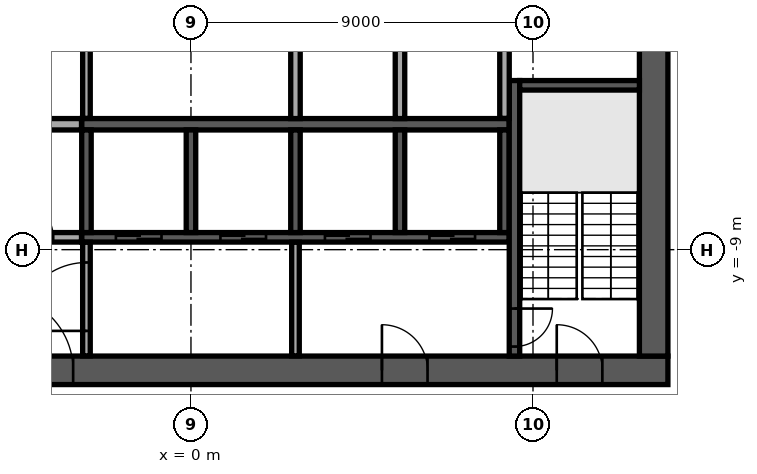
"""IFC4 building model, lengths in metres.
Left out: names, types, materials, properties, quantities, classifications, styles, units other than length and angle.
Written with IfcOpenShell. Run it as: python <this file> out.ifc"""

import sys

from ifc_helpers import new_model, si_unit, direction, frame, frame_2d, origin, place, context, subcontext, project, spatial, rectangle, extrude, element, fill, save


model = new_model("IFC4")
c1 = context("Model", 3, precision=1e-05, world=origin(), true_north=direction((0.0, 1.0)))
c2 = subcontext(c1, "Body", "Model", "MODEL_VIEW")
j1 = project(units=[si_unit("LENGTHUNIT", "METRE"), si_unit("PLANEANGLEUNIT", "RADIAN")], contexts=[c1])
p1 = place(None, origin())
s1 = spatial("IfcSite", under=j1, at=p1, CompositionType="ELEMENT")
p2 = place(p1, origin())
s2 = spatial("IfcBuilding", under=s1, at=p2, CompositionType="ELEMENT")
p3 = place(p2, frame((0.0, 0.0, 242.9)))
s3 = spatial("IfcBuildingStorey", under=s2, at=p3, CompositionType="ELEMENT", Elevation=242.9)
p4 = place(p3, frame((-12.55, -12.175, 0.0), z_axis=(0.0, 0.0, 1.0), x_axis=(1.0, 0.0, 0.0)))
e1 = element("IfcWall", 1, at=p4, inside=s3, PredefinedType="SHEAR", context=c2, shape_type="SweptSolid", body=[
    extrude(rectangle(XDim=25.1, YDim=0.75, at=frame_2d((12.55, 0.0))), origin(), (0.0, 0.0, 1.0), 3.64),
])
p5 = place(p4, frame((7.45, 0.0, 0.0)))
e2 = element("IfcOpeningElement", 2, at=p5, cuts=e1, PredefinedType="OPENING", context=c2, shape_type="SweptSolid", body=[
    extrude(rectangle(XDim=2.0, YDim=2.1, at=frame_2d((1.0, 1.05))), frame((0.0, 0.385, 0.0), z_axis=(0.0, -1.0, 0.0), x_axis=(1.0, 0.0, 0.0)), (0.0, 0.0, 1.0), 0.77),
])
p6 = place(p4, frame((17.575, 0.0, 0.0)))
e3 = element("IfcOpeningElement", 3, at=p6, cuts=e1, PredefinedType="OPENING", context=c2, shape_type="SweptSolid", body=[
    extrude(rectangle(XDim=1.2, YDim=2.1, at=frame_2d((0.6, 1.05))), frame((0.0, 0.385, 0.0), z_axis=(0.0, -1.0, 0.0), x_axis=(1.0, 0.0, 0.0)), (0.0, 0.0, 1.0), 0.77),
])
p7 = place(p4, frame((1.725, 0.0, 0.0)))
e4 = element("IfcOpeningElement", 4, at=p7, cuts=e1, PredefinedType="OPENING", context=c2, shape_type="SweptSolid", body=[
    extrude(rectangle(XDim=1.2, YDim=2.1, at=frame_2d((0.6, 1.05))), frame((0.0, 0.385, 0.0), z_axis=(0.0, -1.0, 0.0), x_axis=(1.0, 0.0, 0.0)), (0.0, 0.0, 1.0), 0.77),
])
p8 = place(p4, frame((22.175, 0.0, 0.0)))
e5 = element("IfcOpeningElement", 5, at=p8, cuts=e1, PredefinedType="OPENING", context=c2, shape_type="SweptSolid", body=[
    extrude(rectangle(XDim=1.2, YDim=2.1, at=frame_2d((0.6, 1.05))), frame((0.0, 0.385, 0.0), z_axis=(0.0, -1.0, 0.0), x_axis=(1.0, 0.0, 0.0)), (0.0, 0.0, 1.0), 0.77),
])
p9 = place(p3, frame((12.175, -11.8, 0.0), z_axis=(0.0, 0.0, 1.0), x_axis=(0.0, 1.0, 0.0)))
e6 = element("IfcWall", 6, at=p9, inside=s3, PredefinedType="SHEAR", context=c2, shape_type="SweptSolid", body=[
    extrude(rectangle(XDim=23.6, YDim=0.75, at=frame_2d((11.8, 0.0))), origin(), (0.0, 0.0, 1.0), 3.64),
])
p10 = place(p9, frame((10.6, 0.0, 0.0)))
e7 = element("IfcOpeningElement", 7, at=p10, cuts=e6, PredefinedType="OPENING", context=c2, shape_type="SweptSolid", body=[
    extrude(rectangle(XDim=2.4, YDim=2.4, at=frame_2d((1.2, 1.2))), frame((0.0, 0.385, 0.0), z_axis=(0.0, -1.0, 0.0), x_axis=(1.0, 0.0, 0.0)), (0.0, 0.0, 1.0), 0.77),
])
p11 = place(p3, frame((-2.875, -5.7, 0.0), z_axis=(0.0, 0.0, 1.0), x_axis=(1.0, 0.0, 0.0)))
e8 = element("IfcWall", 8, at=p11, inside=s3, PredefinedType="SOLIDWALL", context=c2, shape_type="SweptSolid", body=[
    extrude(rectangle(XDim=11.25, YDim=0.3, at=frame_2d((5.625, 0.0))), origin(), (0.0, 0.0, 1.0), 3.64),
])
for number, where, z_axis, x_axis in (
    (9, (2.75, -5.55, 0.0), (0.0, 0.0, 1.0), (0.0, 1.0, 0.0)),
    (10, (5.5, -5.55, 0.0), (0.0, 0.0, 1.0), (0.0, 1.0, 0.0)),
):
    element("IfcWall", number, at=place(p3, frame(where, z_axis=z_axis, x_axis=x_axis)), inside=s3, PredefinedType="SOLIDWALL", context=c2, shape_type="SweptSolid", body=[
        extrude(rectangle(XDim=2.7, YDim=0.25, at=frame_2d((1.35, 0.0))), origin(), (0.0, 0.0, 1.0), 3.64),
    ])
p12 = place(p3, frame((-2.875, -8.675, 0.0), z_axis=(0.0, 0.0, 1.0), x_axis=(1.0, 0.0, 0.0)))
e11 = element("IfcWall", 11, at=p12, inside=s3, PredefinedType="SOLIDWALL", context=c2, shape_type="SweptSolid", body=[
    extrude(rectangle(XDim=11.25, YDim=0.25, at=frame_2d((5.625, 0.0))), origin(), (0.0, 0.0, 1.0), 3.64),
])
p13 = place(p12, frame((0.9, 0.0, 0.0)))
e12 = element("IfcOpeningElement", 12, at=p13, cuts=e11, PredefinedType="OPENING", context=c2, shape_type="SweptSolid", body=[
    extrude(rectangle(XDim=1.2, YDim=2.1, at=frame_2d((0.6, 1.05))), frame((0.0, 0.135, 0.0), z_axis=(0.0, -1.0, 0.0), x_axis=(1.0, 0.0, 0.0)), (0.0, 0.0, 1.0), 0.27),
])
p14 = place(p12, frame((3.65, 0.0, 0.0)))
e13 = element("IfcOpeningElement", 13, at=p14, cuts=e11, PredefinedType="OPENING", context=c2, shape_type="SweptSolid", body=[
    extrude(rectangle(XDim=1.2, YDim=2.1, at=frame_2d((0.6, 1.05))), frame((0.0, 0.135, 0.0), z_axis=(0.0, -1.0, 0.0), x_axis=(1.0, 0.0, 0.0)), (0.0, 0.0, 1.0), 0.27),
])
p15 = place(p12, frame((6.4, 0.0, 0.0)))
e14 = element("IfcOpeningElement", 14, at=p15, cuts=e11, PredefinedType="OPENING", context=c2, shape_type="SweptSolid", body=[
    extrude(rectangle(XDim=1.2, YDim=2.1, at=frame_2d((0.6, 1.05))), frame((0.0, 0.135, 0.0), z_axis=(0.0, -1.0, 0.0), x_axis=(1.0, 0.0, 0.0)), (0.0, 0.0, 1.0), 0.27),
])
p16 = place(p12, frame((9.15, 0.0, 0.0)))
e15 = element("IfcOpeningElement", 15, at=p16, cuts=e11, PredefinedType="OPENING", context=c2, shape_type="SweptSolid", body=[
    extrude(rectangle(XDim=1.2, YDim=2.1, at=frame_2d((0.6, 1.05))), frame((0.0, 0.135, 0.0), z_axis=(0.0, -1.0, 0.0), x_axis=(1.0, 0.0, 0.0)), (0.0, 0.0, 1.0), 0.27),
])
for number, where, z_axis, x_axis in (
    (16, (-2.75, -8.55, 0.0), (0.0, 0.0, 1.0), (0.0, 1.0, 0.0)),
    (17, (0.0, -8.55, 0.0), (0.0, 0.0, 1.0), (0.0, 1.0, 0.0)),
    (18, (2.75, -8.55, 0.0), (0.0, 0.0, 1.0), (0.0, 1.0, 0.0)),
    (19, (5.5, -8.55, 0.0), (0.0, 0.0, 1.0), (0.0, 1.0, 0.0)),
    (20, (8.25, -8.55, 0.0), (0.0, 0.0, 1.0), (0.0, 1.0, 0.0)),
):
    element("IfcWall", number, at=place(p3, frame(where, z_axis=z_axis, x_axis=x_axis)), inside=s3, PredefinedType="SOLIDWALL", context=c2, shape_type="SweptSolid", body=[
        extrude(rectangle(XDim=2.7, YDim=0.25, at=frame_2d((1.35, 0.0))), origin(), (0.0, 0.0, 1.0), 3.64),
    ])
p17 = place(p3, frame((8.512, -4.55, 0.0), z_axis=(0.0, 0.0, 1.0), x_axis=(0.0, -1.0, 0.0)))
e21 = element("IfcWall", 21, at=p17, inside=s3, PredefinedType="SOLIDWALL", context=c2, shape_type="SweptSolid", body=[
    extrude(rectangle(XDim=7.25, YDim=0.275, at=frame_2d((3.625, 0.0))), origin(), (0.0, 0.0, 1.0), 3.64),
])
p18 = place(p17, frame((6.0, 0.0, 0.0)))
e22 = element("IfcOpeningElement", 22, at=p18, cuts=e21, PredefinedType="OPENING", context=c2, shape_type="SweptSolid", body=[
    extrude(rectangle(XDim=1.0, YDim=2.1, at=frame_2d((0.5, 1.05))), frame((0.0, 0.147, 0.0), z_axis=(0.0, -1.0, 0.0), x_axis=(1.0, 0.0, 0.0)), (0.0, 0.0, 1.0), 0.295),
])
p19 = place(p3, frame((8.65, -4.675, 0.0), z_axis=(0.0, 0.0, 1.0), x_axis=(1.0, 0.0, 0.0)))
e23 = element("IfcWall", 23, at=p19, inside=s3, PredefinedType="SOLIDWALL", context=c2, shape_type="SweptSolid", body=[
    extrude(rectangle(XDim=3.15, YDim=0.25, at=frame_2d((1.575, 0.0))), origin(), (0.0, 0.0, 1.0), 3.64),
])
p20 = place(p3, frame((-2.75, -11.795, 0.0), z_axis=(0.0, 0.0, 1.0), x_axis=(0.0, 1.0, 0.0)))
e24 = element("IfcWall", 24, at=p20, inside=s3, PredefinedType="PARTITIONING", context=c2, shape_type="SweptSolid", body=[
    extrude(rectangle(XDim=2.99, YDim=0.2, at=frame_2d((1.495, 0.0))), origin(), (0.0, 0.0, 1.0), 3.64),
])
p21 = place(p20, frame((0.657, 0.0, 0.0)))
e25 = element("IfcOpeningElement", 25, at=p21, cuts=e24, PredefinedType="OPENING", context=c2, shape_type="SweptSolid", body=[
    extrude(rectangle(XDim=1.8, YDim=2.1, at=frame_2d((0.9, 1.05))), frame((0.0, 0.11, 0.0), z_axis=(0.0, -1.0, 0.0), x_axis=(1.0, 0.0, 0.0)), (0.0, 0.0, 1.0), 0.22),
])
p22 = place(p3, frame((2.75, -11.795, 0.0), z_axis=(0.0, 0.0, 1.0), x_axis=(0.0, 1.0, 0.0)))
e26 = element("IfcWall", 26, at=p22, inside=s3, PredefinedType="PARTITIONING", context=c2, shape_type="SweptSolid", body=[
    extrude(rectangle(XDim=2.99, YDim=0.2, at=frame_2d((1.495, 0.0))), origin(), (0.0, 0.0, 1.0), 3.64),
])
p23 = place(p3, frame((-8.37, -8.675, 0.0), z_axis=(0.0, 0.0, 1.0), x_axis=(1.0, 0.0, 0.0)))
e27 = element("IfcWall", 27, at=p23, inside=s3, PredefinedType="PARTITIONING", context=c2, shape_type="SweptSolid", body=[
    extrude(rectangle(XDim=5.49, YDim=0.25, at=frame_2d((2.745, 0.0))), origin(), (0.0, 0.0, 1.0), 3.64),
])
p24 = place(p23, frame((0.995, 0.0, 0.0)))
e28 = element("IfcOpeningElement", 28, at=p24, cuts=e27, PredefinedType="OPENING", context=c2, shape_type="SweptSolid", body=[
    extrude(rectangle(XDim=1.0, YDim=2.1, at=frame_2d((0.5, 1.05))), frame((0.0, 0.135, 0.0), z_axis=(0.0, -1.0, 0.0), x_axis=(1.0, 0.0, 0.0)), (0.0, 0.0, 1.0), 0.27),
])
p25 = place(p23, frame((3.745, 0.0, 0.0)))
e29 = element("IfcOpeningElement", 29, at=p25, cuts=e27, PredefinedType="OPENING", context=c2, shape_type="SweptSolid", body=[
    extrude(rectangle(XDim=1.0, YDim=2.1, at=frame_2d((0.5, 1.05))), frame((0.0, 0.135, 0.0), z_axis=(0.0, -1.0, 0.0), x_axis=(1.0, 0.0, 0.0)), (0.0, 0.0, 1.0), 0.27),
])
p26 = place(p3, frame((-8.35, -5.7, 0.0), z_axis=(0.0, 0.0, 1.0), x_axis=(1.0, 0.0, 0.0)))
e30 = element("IfcWall", 30, at=p26, inside=s3, PredefinedType="PARTITIONING", context=c2, shape_type="SweptSolid", body=[
    extrude(rectangle(XDim=5.47, YDim=0.3, at=frame_2d((2.735, 0.0))), origin(), (0.0, 0.0, 1.0), 3.64),
])
p27 = place(p3, frame((-2.75, -5.545, 0.0), z_axis=(0.0, 0.0, 1.0), x_axis=(0.0, 1.0, 0.0)))
e31 = element("IfcWall", 31, at=p27, inside=s3, PredefinedType="PARTITIONING", context=c2, shape_type="SweptSolid", body=[
    extrude(rectangle(XDim=2.69, YDim=0.2, at=frame_2d((1.345, 0.0))), origin(), (0.0, 0.0, 1.0), 3.64),
])
p28 = place(p3, frame((8.25, -5.545, 0.0), z_axis=(0.0, 0.0, 1.0), x_axis=(0.0, 1.0, 0.0)))
e32 = element("IfcWall", 32, at=p28, inside=s3, PredefinedType="PARTITIONING", context=c2, shape_type="SweptSolid", body=[
    extrude(rectangle(XDim=2.69, YDim=0.25, at=frame_2d((1.345, 0.0))), origin(), (0.0, 0.0, 1.0), 3.64),
])
p29 = place(p3, frame((5.206, -33.362, 0.0), z_axis=(0.0, 0.0, 1.0), x_axis=(0.573577438409, 0.81915134264, 0.0)))
e33 = element("IfcWall", 33, at=p29, inside=s3, PredefinedType="STANDARD", context=c2, shape_type="SweptSolid", body=[
    extrude(rectangle(XDim=48.686, YDim=0.6, at=frame_2d((24.343, 0.0))), origin(), (0.0, 0.0, 1.0), 3.64),
])
p30 = place(p29, frame((1.213, 0.0, 0.9)))
e34 = element("IfcOpeningElement", 34, at=p30, cuts=e33, PredefinedType="OPENING", context=c2, shape_type="SweptSolid", body=[
    extrude(rectangle(XDim=2.0, YDim=2.1, at=frame_2d((1.0, 1.05))), frame((0.0, 0.31, 0.0), z_axis=(0.0, -1.0, 0.0), x_axis=(1.0, 0.0, 0.0)), (0.0, 0.0, 1.0), 0.62),
])
p31 = place(p29, frame((5.639, 0.0, 0.9)))
e35 = element("IfcOpeningElement", 35, at=p31, cuts=e33, PredefinedType="OPENING", context=c2, shape_type="SweptSolid", body=[
    extrude(rectangle(XDim=2.0, YDim=2.1, at=frame_2d((1.0, 1.05))), frame((0.0, 0.31, 0.0), z_axis=(0.0, -1.0, 0.0), x_axis=(1.0, 0.0, 0.0)), (0.0, 0.0, 1.0), 0.62),
])
p32 = place(p29, frame((10.065, 0.0, 0.9)))
e36 = element("IfcOpeningElement", 36, at=p32, cuts=e33, PredefinedType="OPENING", context=c2, shape_type="SweptSolid", body=[
    extrude(rectangle(XDim=2.0, YDim=2.1, at=frame_2d((1.0, 1.05))), frame((0.0, 0.31, 0.0), z_axis=(0.0, -1.0, 0.0), x_axis=(1.0, 0.0, 0.0)), (0.0, 0.0, 1.0), 0.62),
])
p33 = place(p29, frame((14.491, 0.0, 0.9)))
e37 = element("IfcOpeningElement", 37, at=p33, cuts=e33, PredefinedType="OPENING", context=c2, shape_type="SweptSolid", body=[
    extrude(rectangle(XDim=2.0, YDim=2.1, at=frame_2d((1.0, 1.05))), frame((0.0, 0.31, 0.0), z_axis=(0.0, -1.0, 0.0), x_axis=(1.0, 0.0, 0.0)), (0.0, 0.0, 1.0), 0.62),
])
p34 = place(p29, frame((18.917, 0.0, 0.9)))
e38 = element("IfcOpeningElement", 38, at=p34, cuts=e33, PredefinedType="OPENING", context=c2, shape_type="SweptSolid", body=[
    extrude(rectangle(XDim=2.0, YDim=2.1, at=frame_2d((1.0, 1.05))), frame((0.0, 0.31, 0.0), z_axis=(0.0, -1.0, 0.0), x_axis=(1.0, 0.0, 0.0)), (0.0, 0.0, 1.0), 0.62),
])
p35 = place(p29, frame((23.343, 0.0, 0.9)))
e39 = element("IfcOpeningElement", 39, at=p35, cuts=e33, PredefinedType="OPENING", context=c2, shape_type="SweptSolid", body=[
    extrude(rectangle(XDim=2.0, YDim=2.1, at=frame_2d((1.0, 1.05))), frame((0.0, 0.31, 0.0), z_axis=(0.0, -1.0, 0.0), x_axis=(1.0, 0.0, 0.0)), (0.0, 0.0, 1.0), 0.62),
])
p36 = place(p29, frame((27.769, 0.0, 0.9)))
e40 = element("IfcOpeningElement", 40, at=p36, cuts=e33, PredefinedType="OPENING", context=c2, shape_type="SweptSolid", body=[
    extrude(rectangle(XDim=2.0, YDim=2.1, at=frame_2d((1.0, 1.05))), frame((0.0, 0.31, 0.0), z_axis=(0.0, -1.0, 0.0), x_axis=(1.0, 0.0, 0.0)), (0.0, 0.0, 1.0), 0.62),
])
p37 = place(p29, frame((32.195, 0.0, 0.9)))
e41 = element("IfcOpeningElement", 41, at=p37, cuts=e33, PredefinedType="OPENING", context=c2, shape_type="SweptSolid", body=[
    extrude(rectangle(XDim=2.0, YDim=2.1, at=frame_2d((1.0, 1.05))), frame((0.0, 0.31, 0.0), z_axis=(0.0, -1.0, 0.0), x_axis=(1.0, 0.0, 0.0)), (0.0, 0.0, 1.0), 0.62),
])
p38 = place(p29, frame((36.621, 0.0, 0.9)))
e42 = element("IfcOpeningElement", 42, at=p38, cuts=e33, PredefinedType="OPENING", context=c2, shape_type="SweptSolid", body=[
    extrude(rectangle(XDim=2.0, YDim=2.1, at=frame_2d((1.0, 1.05))), frame((0.0, 0.31, 0.0), z_axis=(0.0, -1.0, 0.0), x_axis=(1.0, 0.0, 0.0)), (0.0, 0.0, 1.0), 0.62),
])
p39 = place(p29, frame((41.047, 0.0, 0.9)))
e43 = element("IfcOpeningElement", 43, at=p39, cuts=e33, PredefinedType="OPENING", context=c2, shape_type="SweptSolid", body=[
    extrude(rectangle(XDim=2.0, YDim=2.1, at=frame_2d((1.0, 1.05))), frame((0.0, 0.31, 0.0), z_axis=(0.0, -1.0, 0.0), x_axis=(1.0, 0.0, 0.0)), (0.0, 0.0, 1.0), 0.62),
])
p40 = place(p29, frame((45.473, 0.0, 0.9)))
e44 = element("IfcOpeningElement", 44, at=p40, cuts=e33, PredefinedType="OPENING", context=c2, shape_type="SweptSolid", body=[
    extrude(rectangle(XDim=2.0, YDim=2.1, at=frame_2d((1.0, 1.05))), frame((0.0, 0.31, 0.0), z_axis=(0.0, -1.0, 0.0), x_axis=(1.0, 0.0, 0.0)), (0.0, 0.0, 1.0), 0.62),
])
p41 = place(p3, frame((-26.231, -7.537, 0.0), z_axis=(0.0, 0.0, 1.0), x_axis=(0.819166569978, -0.573555690959, 0.0)))
e45 = element("IfcWall", 45, at=p41, inside=s3, PredefinedType="PARTITIONING", context=c2, shape_type="SweptSolid", body=[
    extrude(rectangle(XDim=34.403, YDim=0.15, at=frame_2d((17.201, 0.0))), origin(), (0.0, 0.0, 1.0), 3.24),
])
p42 = place(p41, frame((3.05, 0.0, 0.0)))
e46 = element("IfcOpeningElement", 46, at=p42, cuts=e45, PredefinedType="OPENING", context=c2, shape_type="SweptSolid", body=[
    extrude(rectangle(XDim=1.8, YDim=2.1, at=frame_2d((0.9, 1.05))), frame((0.0, 0.085, 0.0), z_axis=(0.0, -1.0, 0.0), x_axis=(1.0, 0.0, 0.0)), (0.0, 0.0, 1.0), 0.17),
])
p43 = place(p41, frame((13.103, 0.0, 0.0)))
e47 = element("IfcOpeningElement", 47, at=p43, cuts=e45, PredefinedType="OPENING", context=c2, shape_type="SweptSolid", body=[
    extrude(rectangle(XDim=1.0, YDim=2.1, at=frame_2d((0.5, 1.05))), frame((0.0, 0.085, 0.0), z_axis=(0.0, -1.0, 0.0), x_axis=(1.0, 0.0, 0.0)), (0.0, 0.0, 1.0), 0.17),
])
p44 = place(p41, frame((19.173, 0.0, 0.0)))
e48 = element("IfcOpeningElement", 48, at=p44, cuts=e45, PredefinedType="OPENING", context=c2, shape_type="SweptSolid", body=[
    extrude(rectangle(XDim=1.0, YDim=2.1, at=frame_2d((0.5, 1.05))), frame((0.0, 0.085, 0.0), z_axis=(0.0, -1.0, 0.0), x_axis=(1.0, 0.0, 0.0)), (0.0, 0.0, 1.0), 0.17),
])
p45 = place(p5, origin())
e49 = element("IfcDoor", 49, at=p45, inside=s3, OperationType="SINGLE_SWING_LEFT", PredefinedType="DOOR", context=c2, shape_type="SweptSolid", body=[
    extrude(rectangle(XDim=2.0, YDim=2.1, at=frame_2d((1.0, 1.05))), frame((0.0, 0.025, 0.0), z_axis=(0.0, -1.0, 0.0), x_axis=(1.0, 0.0, 0.0)), (0.0, 0.0, 1.0), 0.05),
])
fill(e2, e49)
p46 = place(p6, origin())
e50 = element("IfcDoor", 50, at=p46, inside=s3, OperationType="SINGLE_SWING_LEFT", PredefinedType="DOOR", context=c2, shape_type="SweptSolid", body=[
    extrude(rectangle(XDim=1.2, YDim=2.1, at=frame_2d((0.6, 1.05))), frame((0.0, 0.025, 0.0), z_axis=(0.0, -1.0, 0.0), x_axis=(1.0, 0.0, 0.0)), (0.0, 0.0, 1.0), 0.05),
])
fill(e3, e50)
p47 = place(p8, origin())
e51 = element("IfcDoor", 51, at=p47, inside=s3, OperationType="SINGLE_SWING_LEFT", PredefinedType="DOOR", context=c2, shape_type="SweptSolid", body=[
    extrude(rectangle(XDim=1.2, YDim=2.1, at=frame_2d((0.6, 1.05))), frame((0.0, 0.025, 0.0), z_axis=(0.0, -1.0, 0.0), x_axis=(1.0, 0.0, 0.0)), (0.0, 0.0, 1.0), 0.05),
])
fill(e5, e51)
p48 = place(p13, origin())
e52 = element("IfcDoor", 52, at=p48, inside=s3, OperationType="DOUBLE_DOOR_SLIDING", PredefinedType="DOOR", context=c2, shape_type="SweptSolid", body=[
    extrude(rectangle(XDim=1.2, YDim=2.1, at=frame_2d((0.6, 1.05))), frame((0.0, 0.025, 0.0), z_axis=(0.0, -1.0, 0.0), x_axis=(1.0, 0.0, 0.0)), (0.0, 0.0, 1.0), 0.05),
])
fill(e12, e52)
p49 = place(p14, origin())
e53 = element("IfcDoor", 53, at=p49, inside=s3, OperationType="DOUBLE_DOOR_SLIDING", PredefinedType="DOOR", context=c2, shape_type="SweptSolid", body=[
    extrude(rectangle(XDim=1.2, YDim=2.1, at=frame_2d((0.6, 1.05))), frame((0.0, 0.025, 0.0), z_axis=(0.0, -1.0, 0.0), x_axis=(1.0, 0.0, 0.0)), (0.0, 0.0, 1.0), 0.05),
])
fill(e13, e53)
p50 = place(p15, origin())
e54 = element("IfcDoor", 54, at=p50, inside=s3, OperationType="DOUBLE_DOOR_SLIDING", PredefinedType="DOOR", context=c2, shape_type="SweptSolid", body=[
    extrude(rectangle(XDim=1.2, YDim=2.1, at=frame_2d((0.6, 1.05))), frame((0.0, 0.025, 0.0), z_axis=(0.0, -1.0, 0.0), x_axis=(1.0, 0.0, 0.0)), (0.0, 0.0, 1.0), 0.05),
])
fill(e14, e54)
p51 = place(p16, origin())
e55 = element("IfcDoor", 55, at=p51, inside=s3, OperationType="DOUBLE_DOOR_SLIDING", PredefinedType="DOOR", context=c2, shape_type="SweptSolid", body=[
    extrude(rectangle(XDim=1.2, YDim=2.1, at=frame_2d((0.6, 1.05))), frame((0.0, 0.025, 0.0), z_axis=(0.0, -1.0, 0.0), x_axis=(1.0, 0.0, 0.0)), (0.0, 0.0, 1.0), 0.05),
])
fill(e15, e55)
p52 = place(p18, origin())
e56 = element("IfcDoor", 56, at=p52, inside=s3, OperationType="SINGLE_SWING_LEFT", PredefinedType="DOOR", context=c2, shape_type="SweptSolid", body=[
    extrude(rectangle(XDim=1.0, YDim=2.1, at=frame_2d((0.5, 1.05))), frame((0.0, 0.025, 0.0), z_axis=(0.0, -1.0, 0.0), x_axis=(1.0, 0.0, 0.0)), (0.0, 0.0, 1.0), 0.05),
])
fill(e22, e56)
p53 = place(p25, origin())
e57 = element("IfcDoor", 57, at=p53, inside=s3, OperationType="SINGLE_SWING_RIGHT", PredefinedType="DOOR", context=c2, shape_type="SweptSolid", body=[
    extrude(rectangle(XDim=1.0, YDim=2.1, at=frame_2d((0.5, 1.05))), frame((0.0, 0.025, 0.0), z_axis=(0.0, -1.0, 0.0), x_axis=(1.0, 0.0, 0.0)), (0.0, 0.0, 1.0), 0.05),
])
fill(e29, e57)
p54 = place(p21, origin())
e58 = element("IfcDoor", 58, at=p54, inside=s3, OperationType="SINGLE_SWING_LEFT", PredefinedType="DOOR", context=c2, shape_type="SweptSolid", body=[
    extrude(rectangle(XDim=1.8, YDim=2.1, at=frame_2d((0.9, 1.05))), frame((0.0, 0.025, 0.0), z_axis=(0.0, -1.0, 0.0), x_axis=(1.0, 0.0, 0.0)), (0.0, 0.0, 1.0), 0.05),
])
fill(e25, e58)
save(model, sys.argv[1])
